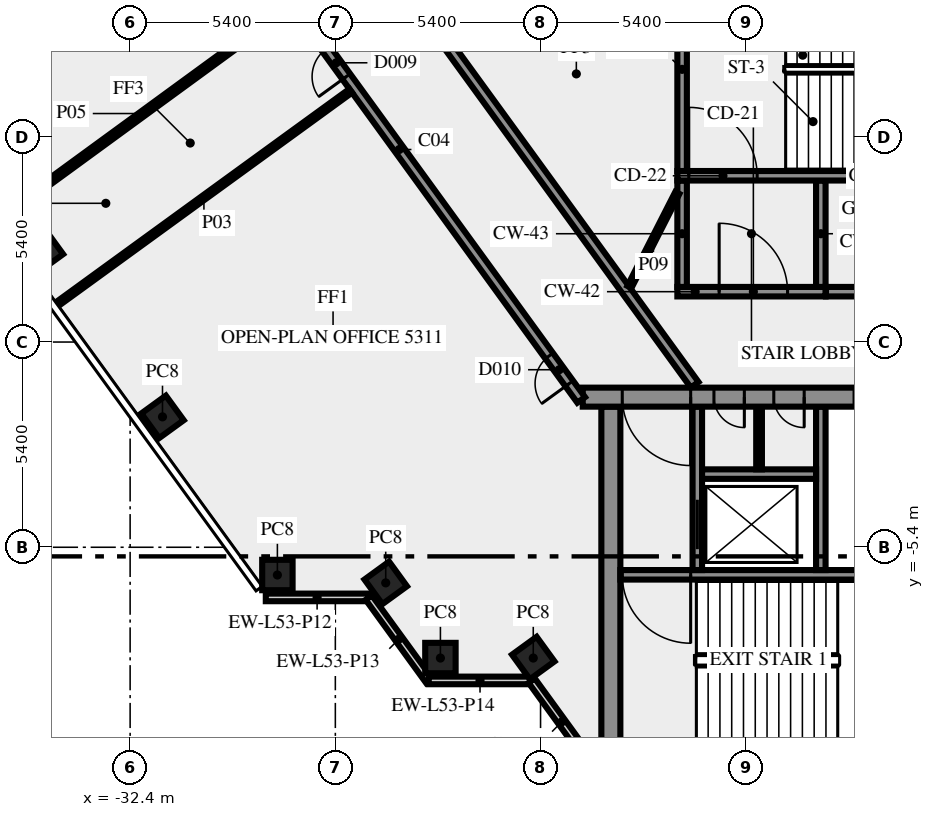
"""IFC4 building model, lengths in metres.
Left out: names, types, materials, properties, quantities, classifications, styles, units other than length and angle.
Written with IfcOpenShell. Run it as: python <this file> out.ifc"""

import sys

from ifc_helpers import new_model, si_unit, direction, frame, frame_2d, origin, origin_2d, place, context, subcontext, project, spatial, rectangle, extrude, element, fill, save


model = new_model("IFC4")
c1 = context("Model", 3, precision=1e-05, world=origin(), true_north=direction((0.0, 1.0)))
c2 = subcontext(c1, "Body", "Model", "MODEL_VIEW")
j1 = project(units=[si_unit("LENGTHUNIT", "METRE"), si_unit("PLANEANGLEUNIT", "RADIAN")], contexts=[c1])
p1 = place(None, origin())
s1 = spatial("IfcSite", under=j1, at=p1, CompositionType="ELEMENT")
p2 = place(p1, origin())
s2 = spatial("IfcBuilding", under=s1, at=p2, CompositionType="ELEMENT")
p3 = place(p2, frame((0.0, 0.0, 226.0)))
s3 = spatial("IfcBuildingStorey", under=s2, at=p3, CompositionType="ELEMENT", Elevation=226.0)
for number, where, z_axis, x_axis in (
    (1, (-34.722, 2.4, 0.0), (0.0, 0.0, 1.0), (0.588, -0.809, 0.0)),
    (2, (-31.548, -1.969, 0.0), (0.0, 0.0, 1.0), (0.588, -0.809, 0.0)),
    (3, (-28.525, -6.13, 0.0), (0.0, 0.0, 1.0), (1.0, 0.0, 0.0)),
    (4, (-25.674, -6.337, 0.0), (0.0, 0.0, 1.0), (0.588, -0.809, 0.0)),
    (5, (-24.235, -8.315, 0.0), (0.0, 0.0, 1.0), (1.0, 0.0, 0.0)),
    (6, (-21.792, -8.315, 0.0), (0.0, 0.0, 1.0), (0.588, -0.809, 0.0)),
):
    element("IfcColumn", number, at=place(p3, frame(where, z_axis=z_axis, x_axis=x_axis)), inside=s3, PredefinedType="COLUMN", context=c2, shape_type="SweptSolid", body=[
        extrude(rectangle(XDim=0.8, YDim=0.8, at=origin_2d()), origin(), (0.0, 0.0, 1.0), 3.65),
    ])
p4 = place(p3, frame((-28.83, -6.719, 0.0), z_axis=(0.0, 0.0, 1.0), x_axis=(1.0, 0.0, 0.0)))
e7 = element("IfcWall", 7, at=p4, inside=s3, PredefinedType="SOLIDWALL", context=c2, shape_type="SweptSolid", body=[
    extrude(rectangle(XDim=2.7, YDim=0.2, at=frame_2d((1.35, 0.0))), origin(), (0.0, 0.0, 1.0), 3.65),
])
p5 = place(p3, frame((-26.12, -6.724, 0.0), z_axis=(0.0, 0.0, 1.0), x_axis=(0.587720002413, -0.809064397168, 0.0)))
e8 = element("IfcWall", 8, at=p5, inside=s3, PredefinedType="SOLIDWALL", context=c2, shape_type="SweptSolid", body=[
    extrude(rectangle(XDim=2.7, YDim=0.2, at=frame_2d((1.35, 0.0))), origin(), (0.0, 0.0, 1.0), 3.65),
])
p6 = place(p3, frame((-24.543, -8.904, 0.0), z_axis=(0.0, 0.0, 1.0), x_axis=(1.0, 0.0, 0.0)))
e9 = element("IfcWall", 9, at=p6, inside=s3, PredefinedType="SOLIDWALL", context=c2, shape_type="SweptSolid", body=[
    extrude(rectangle(XDim=2.7, YDim=0.2, at=frame_2d((1.35, 0.0))), origin(), (0.0, 0.0, 1.0), 3.65),
])
p7 = place(p3, frame((-21.833, -8.909, 0.0), z_axis=(0.0, 0.0, 1.0), x_axis=(0.587766567315, -0.809030569476, 0.0)))
e10 = element("IfcWall", 10, at=p7, inside=s3, PredefinedType="SOLIDWALL", context=c2, shape_type="SweptSolid", body=[
    extrude(rectangle(XDim=2.688, YDim=0.2, at=frame_2d((1.344, 0.0))), origin(), (0.0, 0.0, 1.0), 3.65),
])
p8 = place(p3, frame((-19.75, -10.5, 0.0), z_axis=(0.0, 0.0, 1.0), x_axis=(0.0, 1.0, 0.0)))
e11 = element("IfcWall", 11, at=p8, inside=s3, PredefinedType="SHEAR", context=c2, shape_type="SweptSolid", body=[
    extrude(rectangle(XDim=8.8, YDim=0.5, at=frame_2d((4.4, 0.0))), origin(), (0.0, 0.0, 1.0), 3.65),
])
p9 = place(p3, frame((-11.45, -6.125, 0.0), z_axis=(0.0, 0.0, 1.0), x_axis=(-1.0, 0.0, 0.0)))
e12 = element("IfcWall", 12, at=p9, inside=s3, PredefinedType="SHEAR", context=c2, shape_type="SweptSolid", body=[
    extrude(rectangle(XDim=8.05, YDim=0.25, at=frame_2d((4.025, 0.0))), origin(), (0.0, 0.0, 1.0), 3.65),
])
p10 = place(p9, frame((6.2, 0.0, 0.0)))
e13 = element("IfcOpeningElement", 13, at=p10, cuts=e12, PredefinedType="OPENING", context=c2, shape_type="SweptSolid", body=[
    extrude(rectangle(XDim=1.8, YDim=2.1, at=frame_2d((0.9, 1.05))), frame((0.0, 0.135, 0.0), z_axis=(0.0, -1.0, 0.0), x_axis=(1.0, 0.0, 0.0)), (0.0, 0.0, 1.0), 0.27),
])
p11 = place(p3, frame((-17.475, -6.0, 0.0), z_axis=(0.0, 0.0, 1.0), x_axis=(0.0, 1.0, 0.0)))
e14 = element("IfcWall", 14, at=p11, inside=s3, PredefinedType="SHEAR", context=c2, shape_type="SweptSolid", body=[
    extrude(rectangle(XDim=4.3, YDim=0.25, at=frame_2d((2.15, 0.0))), origin(), (0.0, 0.0, 1.0), 3.65),
])
p12 = place(p11, frame((0.55, 0.0, 0.0)))
e15 = element("IfcOpeningElement", 15, at=p12, cuts=e14, PredefinedType="OPENING", context=c2, shape_type="SweptSolid", body=[
    extrude(rectangle(XDim=1.3, YDim=2.1, at=frame_2d((0.65, 1.05))), frame((0.0, 0.135, 0.0), z_axis=(0.0, -1.0, 0.0), x_axis=(1.0, 0.0, 0.0)), (0.0, 0.0, 1.0), 0.27),
])
p13 = place(p3, frame((-14.225, -6.0, 0.0), z_axis=(0.0, 0.0, 1.0), x_axis=(0.0, 1.0, 0.0)))
e16 = element("IfcWall", 16, at=p13, inside=s3, PredefinedType="SHEAR", context=c2, shape_type="SweptSolid", body=[
    extrude(rectangle(XDim=4.3, YDim=0.25, at=frame_2d((2.15, 0.0))), origin(), (0.0, 0.0, 1.0), 3.65),
])
p14 = place(p3, frame((-17.35, -3.475, 0.0), z_axis=(0.0, 0.0, 1.0), x_axis=(1.0, 0.0, 0.0)))
e17 = element("IfcWall", 17, at=p14, inside=s3, PredefinedType="SHEAR", context=c2, shape_type="SweptSolid", body=[
    extrude(rectangle(XDim=3.0, YDim=0.25, at=frame_2d((1.5, 0.0))), origin(), (0.0, 0.0, 1.0), 3.65),
])
p15 = place(p3, frame((-15.85, -3.35, 0.0), z_axis=(0.0, 0.0, 1.0), x_axis=(0.0, 1.0, 0.0)))
e18 = element("IfcWall", 18, at=p15, inside=s3, PredefinedType="PARTITIONING", context=c2, shape_type="SweptSolid", body=[
    extrude(rectangle(XDim=1.65, YDim=0.15, at=frame_2d((0.825, 0.0))), origin(), (0.0, 0.0, 1.0), 3.65),
])
p16 = place(p3, frame((20.49, -1.45, 0.0), z_axis=(0.0, 0.0, 1.0), x_axis=(-1.0, 0.0, 0.0)))
e19 = element("IfcWall", 19, at=p16, inside=s3, PredefinedType="SHEAR", context=c2, shape_type="SweptSolid", body=[
    extrude(rectangle(XDim=40.98, YDim=0.5, at=frame_2d((20.49, 0.0))), origin(), (0.0, 0.0, 1.0), 3.65),
])
p17 = place(p16, frame((38.14, 0.0, 0.0)))
e20 = element("IfcOpeningElement", 20, at=p17, cuts=e19, PredefinedType="OPENING", context=c2, shape_type="SweptSolid", body=[
    extrude(rectangle(XDim=1.8, YDim=2.1, at=frame_2d((0.9, 1.05))), frame((0.0, 0.26, 0.0), z_axis=(0.0, -1.0, 0.0), x_axis=(1.0, 0.0, 0.0)), (0.0, 0.0, 1.0), 0.52),
])
p18 = place(p16, frame((36.728, 0.0, 0.0)))
e21 = element("IfcOpeningElement", 21, at=p18, cuts=e19, PredefinedType="OPENING", context=c2, shape_type="SweptSolid", body=[
    extrude(rectangle(XDim=0.8, YDim=2.1, at=frame_2d((0.4, 1.05))), frame((0.0, 0.26, 0.0), z_axis=(0.0, -1.0, 0.0), x_axis=(1.0, 0.0, 0.0)), (0.0, 0.0, 1.0), 0.52),
])
p19 = place(p16, frame((35.153, 0.0, 0.0)))
e22 = element("IfcOpeningElement", 22, at=p19, cuts=e19, PredefinedType="OPENING", context=c2, shape_type="SweptSolid", body=[
    extrude(rectangle(XDim=0.8, YDim=2.1, at=frame_2d((0.4, 1.05))), frame((0.0, 0.26, 0.0), z_axis=(0.0, -1.0, 0.0), x_axis=(1.0, 0.0, 0.0)), (0.0, 0.0, 1.0), 0.52),
])
p20 = place(p16, frame((32.94, 0.0, 0.0)))
e23 = element("IfcOpeningElement", 23, at=p20, cuts=e19, PredefinedType="OPENING", context=c2, shape_type="SweptSolid", body=[
    extrude(rectangle(XDim=0.9, YDim=2.1, at=frame_2d((0.45, 1.05))), frame((0.0, 0.26, 0.0), z_axis=(0.0, -1.0, 0.0), x_axis=(1.0, 0.0, 0.0)), (0.0, 0.0, 1.0), 0.52),
])
p21 = place(p16, frame((30.202, 0.0, 0.0)))
e24 = element("IfcOpeningElement", 24, at=p21, cuts=e19, PredefinedType="OPENING", context=c2, shape_type="SweptSolid", body=[
    extrude(rectangle(XDim=0.9, YDim=2.1, at=frame_2d((0.45, 1.05))), frame((0.0, 0.26, 0.0), z_axis=(0.0, -1.0, 0.0), x_axis=(1.0, 0.0, 0.0)), (0.0, 0.0, 1.0), 0.52),
])
p22 = place(p16, frame((27.74, 0.0, 0.0)))
e25 = element("IfcOpeningElement", 25, at=p22, cuts=e19, PredefinedType="OPENING", context=c2, shape_type="SweptSolid", body=[
    extrude(rectangle(XDim=0.9, YDim=2.1, at=frame_2d((0.45, 1.05))), frame((0.0, 0.26, 0.0), z_axis=(0.0, -1.0, 0.0), x_axis=(1.0, 0.0, 0.0)), (0.0, 0.0, 1.0), 0.52),
])
p23 = place(p16, frame((25.377, 0.0, 0.0)))
e26 = element("IfcOpeningElement", 26, at=p23, cuts=e19, PredefinedType="OPENING", context=c2, shape_type="SweptSolid", body=[
    extrude(rectangle(XDim=0.9, YDim=2.1, at=frame_2d((0.45, 1.05))), frame((0.0, 0.26, 0.0), z_axis=(0.0, -1.0, 0.0), x_axis=(1.0, 0.0, 0.0)), (0.0, 0.0, 1.0), 0.52),
])
p24 = place(p16, frame((20.74, 0.0, 0.0)))
e27 = element("IfcOpeningElement", 27, at=p24, cuts=e19, PredefinedType="OPENING", context=c2, shape_type="SweptSolid", body=[
    extrude(rectangle(XDim=2.0, YDim=2.1, at=frame_2d((1.0, 1.05))), frame((0.0, 0.26, 0.0), z_axis=(0.0, -1.0, 0.0), x_axis=(1.0, 0.0, 0.0)), (0.0, 0.0, 1.0), 0.52),
])
p25 = place(p16, frame((7.14, 0.0, 0.0)))
e28 = element("IfcOpeningElement", 28, at=p25, cuts=e19, PredefinedType="OPENING", context=c2, shape_type="SweptSolid", body=[
    extrude(rectangle(XDim=0.9, YDim=2.1, at=frame_2d((0.45, 1.05))), frame((0.0, 0.26, 0.0), z_axis=(0.0, -1.0, 0.0), x_axis=(1.0, 0.0, 0.0)), (0.0, 0.0, 1.0), 0.52),
])
p26 = place(p16, frame((4.19, 0.0, 0.0)))
e29 = element("IfcOpeningElement", 29, at=p26, cuts=e19, PredefinedType="OPENING", context=c2, shape_type="SweptSolid", body=[
    extrude(rectangle(XDim=0.9, YDim=2.1, at=frame_2d((0.45, 1.05))), frame((0.0, 0.26, 0.0), z_axis=(0.0, -1.0, 0.0), x_axis=(1.0, 0.0, 0.0)), (0.0, 0.0, 1.0), 0.52),
])
p27 = place(p16, frame((1.04, 0.0, 0.0)))
e30 = element("IfcOpeningElement", 30, at=p27, cuts=e19, PredefinedType="OPENING", context=c2, shape_type="SweptSolid", body=[
    extrude(rectangle(XDim=1.8, YDim=2.1, at=frame_2d((0.9, 1.05))), frame((0.0, 0.26, 0.0), z_axis=(0.0, -1.0, 0.0), x_axis=(1.0, 0.0, 0.0)), (0.0, 0.0, 1.0), 0.52),
])
p28 = place(p3, frame((-18.0, 1.325, 0.0), z_axis=(0.0, 0.0, 1.0), x_axis=(1.0, 0.0, 0.0)))
e31 = element("IfcWall", 31, at=p28, inside=s3, PredefinedType="SHEAR", context=c2, shape_type="SweptSolid", body=[
    extrude(rectangle(XDim=3.9, YDim=0.25, at=frame_2d((1.95, 0.0))), origin(), (0.0, 0.0, 1.0), 3.65),
])
p29 = place(p28, frame((1.1, 0.0, 0.0)))
e32 = element("IfcOpeningElement", 32, at=p29, cuts=e31, PredefinedType="OPENING", context=c2, shape_type="SweptSolid", body=[
    extrude(rectangle(XDim=1.8, YDim=2.1, at=frame_2d((0.9, 1.05))), frame((0.0, 0.135, 0.0), z_axis=(0.0, -1.0, 0.0), x_axis=(1.0, 0.0, 0.0)), (0.0, 0.0, 1.0), 0.27),
])
for number, where, z_axis, x_axis in (
    (33, (-17.875, 1.45, 0.0), (0.0, 0.0, 1.0), (0.0, 1.0, 0.0)),
    (34, (-14.225, 1.45, 0.0), (0.0, 0.0, 1.0), (0.0, 1.0, 0.0)),
):
    element("IfcWall", number, at=place(p3, frame(where, z_axis=z_axis, x_axis=x_axis)), inside=s3, PredefinedType="SHEAR", context=c2, shape_type="SweptSolid", body=[
        extrude(rectangle(XDim=2.8, YDim=0.25, at=frame_2d((1.4, 0.0))), origin(), (0.0, 0.0, 1.0), 3.65),
    ])
p30 = place(p3, frame((-18.0, 4.375, 0.0), z_axis=(0.0, 0.0, 1.0), x_axis=(1.0, 0.0, 0.0)))
e35 = element("IfcWall", 35, at=p30, inside=s3, PredefinedType="SHEAR", context=c2, shape_type="SweptSolid", body=[
    extrude(rectangle(XDim=10.5, YDim=0.25, at=frame_2d((5.25, 0.0))), origin(), (0.0, 0.0, 1.0), 3.65),
])
p31 = place(p30, frame((0.3, 0.0, 0.0)))
e36 = element("IfcOpeningElement", 36, at=p31, cuts=e35, PredefinedType="OPENING", context=c2, shape_type="SweptSolid", body=[
    extrude(rectangle(XDim=1.8, YDim=2.1, at=frame_2d((0.9, 1.05))), frame((0.0, 0.135, 0.0), z_axis=(0.0, -1.0, 0.0), x_axis=(1.0, 0.0, 0.0)), (0.0, 0.0, 1.0), 0.27),
])
p32 = place(p3, frame((-17.875, 4.5, 0.0), z_axis=(0.0, 0.0, 1.0), x_axis=(0.0, 1.0, 0.0)))
e37 = element("IfcWall", 37, at=p32, inside=s3, PredefinedType="SHEAR", context=c2, shape_type="SweptSolid", body=[
    extrude(rectangle(XDim=5.35, YDim=0.25, at=frame_2d((2.675, 0.0))), origin(), (0.0, 0.0, 1.0), 3.65),
])
p33 = place(p3, frame((-20.531, -1.523, 0.0), z_axis=(0.0, 0.0, 1.0), x_axis=(-0.587784239999, 0.809017729849, 0.0)))
e38 = element("IfcWall", 38, at=p33, inside=s3, PredefinedType="SOLIDWALL", context=c2, shape_type="SweptSolid", body=[
    extrude(rectangle(XDim=23.271, YDim=0.25, at=frame_2d((11.635, 0.0))), origin(), (0.0, 0.0, 1.0), 3.65),
])
p34 = place(p33, frame((0.533, 0.0, 0.0)))
e39 = element("IfcOpeningElement", 39, at=p34, cuts=e38, PredefinedType="OPENING", context=c2, shape_type="SweptSolid", body=[
    extrude(rectangle(XDim=0.9, YDim=2.1, at=frame_2d((0.45, 1.05))), frame((0.0, 0.135, 0.0), z_axis=(0.0, -1.0, 0.0), x_axis=(1.0, 0.0, 0.0)), (0.0, 0.0, 1.0), 0.27),
])
p35 = place(p33, frame((17.106, 0.0, 0.0)))
e40 = element("IfcOpeningElement", 40, at=p35, cuts=e38, PredefinedType="OPENING", context=c2, shape_type="SweptSolid", body=[
    extrude(rectangle(XDim=1.8, YDim=2.1, at=frame_2d((0.9, 1.05))), frame((0.0, 0.135, 0.0), z_axis=(0.0, -1.0, 0.0), x_axis=(1.0, 0.0, 0.0)), (0.0, 0.0, 1.0), 0.27),
])
p36 = place(p33, frame((10.516, 0.0, 0.0)))
e41 = element("IfcOpeningElement", 41, at=p36, cuts=e38, PredefinedType="OPENING", context=c2, shape_type="SweptSolid", body=[
    extrude(rectangle(XDim=0.9, YDim=2.1, at=frame_2d((0.45, 1.05))), frame((0.0, 0.135, 0.0), z_axis=(0.0, -1.0, 0.0), x_axis=(1.0, 0.0, 0.0)), (0.0, 0.0, 1.0), 0.27),
])
p37 = place(p3, frame((-31.918, 18.658, 0.0), z_axis=(0.0, 0.0, 1.0), x_axis=(0.587788731405, -0.80901446664, 0.0)))
e42 = element("IfcWall", 42, at=p37, inside=s3, PredefinedType="SOLIDWALL", context=c2, shape_type="SweptSolid", body=[
    extrude(rectangle(XDim=24.453, YDim=0.25, at=frame_2d((12.227, 0.0))), origin(), (0.0, 0.0, 1.0), 3.65),
])
p38 = place(p37, frame((8.395, 0.0, 0.0)))
e43 = element("IfcOpeningElement", 43, at=p38, cuts=e42, PredefinedType="OPENING", context=c2, shape_type="SweptSolid", body=[
    extrude(rectangle(XDim=1.0, YDim=2.1, at=frame_2d((0.5, 1.05))), frame((0.0, 0.135, 0.0), z_axis=(0.0, -1.0, 0.0), x_axis=(1.0, 0.0, 0.0)), (0.0, 0.0, 1.0), 0.27),
])
p39 = place(p37, frame((10.095, 0.0, 0.0)))
e44 = element("IfcOpeningElement", 44, at=p39, cuts=e42, PredefinedType="OPENING", context=c2, shape_type="SweptSolid", body=[
    extrude(rectangle(XDim=0.9, YDim=2.1, at=frame_2d((0.45, 1.05))), frame((0.0, 0.135, 0.0), z_axis=(0.0, -1.0, 0.0), x_axis=(1.0, 0.0, 0.0)), (0.0, 0.0, 1.0), 0.27),
])
p40 = place(p3, frame((-14.09, 1.325, 0.0), z_axis=(0.0, 0.0, 1.0), x_axis=(1.0, 0.0, 0.0)))
e45 = element("IfcWall", 45, at=p40, inside=s3, PredefinedType="SOLIDWALL", context=c2, shape_type="SweptSolid", body=[
    extrude(rectangle(XDim=9.431, YDim=0.25, at=frame_2d((4.716, 0.0))), origin(), (0.0, 0.0, 1.0), 3.65),
])
p41 = place(p40, frame((3.765, 0.0, 0.0)))
e46 = element("IfcOpeningElement", 46, at=p41, cuts=e45, PredefinedType="OPENING", context=c2, shape_type="SweptSolid", body=[
    extrude(rectangle(XDim=1.8, YDim=2.1, at=frame_2d((0.9, 1.05))), frame((0.0, 0.135, 0.0), z_axis=(0.0, -1.0, 0.0), x_axis=(1.0, 0.0, 0.0)), (0.0, 0.0, 1.0), 0.27),
])
p42 = place(p3, frame((-26.595, 6.611, 0.0), z_axis=(0.0, 0.0, 1.0), x_axis=(-0.80900684162, -0.587799226107, 0.0)))
e47 = element("IfcWall", 47, at=p42, inside=s3, PredefinedType="PARTITIONING", context=c2, shape_type="SweptSolid", body=[
    extrude(rectangle(XDim=9.55, YDim=0.12, at=frame_2d((4.775, 0.0))), origin(), (0.0, 0.0, 1.0), 2.85),
])
p43 = place(p3, frame((-35.919, 3.197, 0.0), z_axis=(0.0, 0.0, 1.0), x_axis=(0.807645841498, 0.589667868135, 0.0)))
e48 = element("IfcWall", 48, at=p43, inside=s3, PredefinedType="PARTITIONING", context=c2, shape_type="SweptSolid", body=[
    extrude(rectangle(XDim=9.551, YDim=0.15, at=frame_2d((4.775, 0.0))), origin(), (0.0, 0.0, 1.0), 2.85),
])
p44 = place(p3, frame((-19.261, 1.45, 0.0), z_axis=(0.0, 0.0, 1.0), x_axis=(0.453950796792, 0.891026752736, 0.0)))
e49 = element("IfcWall", 49, at=p44, inside=s3, PredefinedType="PARTITIONING", context=c2, shape_type="SweptSolid", body=[
    extrude(rectangle(XDim=2.778, YDim=0.12, at=frame_2d((1.389, 0.0))), origin(), (0.0, 0.0, 1.0), 3.65),
])
p45 = place(p10, origin())
e50 = element("IfcDoor", 50, at=p45, inside=s3, OperationType="DOUBLE_DOOR_SINGLE_SWING", PredefinedType="DOOR", context=c2, shape_type="SweptSolid", body=[
    extrude(rectangle(XDim=1.8, YDim=2.1, at=frame_2d((0.9, 1.05))), frame((0.0, 0.025, 0.0), z_axis=(0.0, -1.0, 0.0), x_axis=(1.0, 0.0, 0.0)), (0.0, 0.0, 1.0), 0.05),
])
fill(e13, e50)
p46 = place(p12, origin())
e51 = element("IfcDoor", 51, at=p46, inside=s3, OperationType="DOUBLE_DOOR_SLIDING", PredefinedType="DOOR", context=c2, shape_type="SweptSolid", body=[
    extrude(rectangle(XDim=1.3, YDim=2.1, at=frame_2d((0.65, 1.05))), frame((0.0, 0.025, 0.0), z_axis=(0.0, -1.0, 0.0), x_axis=(1.0, 0.0, 0.0)), (0.0, 0.0, 1.0), 0.05),
])
fill(e15, e51)
p47 = place(p17, origin())
e52 = element("IfcDoor", 52, at=p47, inside=s3, OperationType="DOUBLE_DOOR_SINGLE_SWING", PredefinedType="DOOR", context=c2, shape_type="SweptSolid", body=[
    extrude(rectangle(XDim=1.8, YDim=2.1, at=frame_2d((0.9, 1.05))), frame((0.0, 0.025, 0.0), z_axis=(0.0, -1.0, 0.0), x_axis=(1.0, 0.0, 0.0)), (0.0, 0.0, 1.0), 0.05),
])
fill(e20, e52)
p48 = place(p18, origin())
e53 = element("IfcDoor", 53, at=p48, inside=s3, OperationType="SINGLE_SWING_RIGHT", PredefinedType="DOOR", context=c2, shape_type="SweptSolid", body=[
    extrude(rectangle(XDim=0.8, YDim=2.1, at=frame_2d((0.4, 1.05))), frame((0.0, 0.025, 0.0), z_axis=(0.0, -1.0, 0.0), x_axis=(1.0, 0.0, 0.0)), (0.0, 0.0, 1.0), 0.05),
])
fill(e21, e53)
p49 = place(p19, origin())
e54 = element("IfcDoor", 54, at=p49, inside=s3, OperationType="SINGLE_SWING_RIGHT", PredefinedType="DOOR", context=c2, shape_type="SweptSolid", body=[
    extrude(rectangle(XDim=0.8, YDim=2.1, at=frame_2d((0.4, 1.05))), frame((0.0, 0.025, 0.0), z_axis=(0.0, -1.0, 0.0), x_axis=(1.0, 0.0, 0.0)), (0.0, 0.0, 1.0), 0.05),
])
fill(e22, e54)
p50 = place(p29, origin())
e55 = element("IfcDoor", 55, at=p50, inside=s3, OperationType="DOUBLE_DOOR_SINGLE_SWING", PredefinedType="DOOR", context=c2, shape_type="SweptSolid", body=[
    extrude(rectangle(XDim=1.8, YDim=2.1, at=frame_2d((0.9, 1.05))), frame((0.0, 0.025, 0.0), z_axis=(0.0, -1.0, 0.0), x_axis=(1.0, 0.0, 0.0)), (0.0, 0.0, 1.0), 0.05),
])
fill(e32, e55)
p51 = place(p31, origin())
e56 = element("IfcDoor", 56, at=p51, inside=s3, OperationType="DOUBLE_DOOR_SINGLE_SWING", PredefinedType="DOOR", context=c2, shape_type="SweptSolid", body=[
    extrude(rectangle(XDim=1.8, YDim=2.1, at=frame_2d((0.9, 1.05))), frame((0.0, 0.025, 0.0), z_axis=(0.0, -1.0, 0.0), x_axis=(1.0, 0.0, 0.0)), (0.0, 0.0, 1.0), 0.05),
])
fill(e36, e56)
p52 = place(p34, origin())
e57 = element("IfcDoor", 57, at=p52, inside=s3, OperationType="SINGLE_SWING_LEFT", PredefinedType="DOOR", context=c2, shape_type="SweptSolid", body=[
    extrude(rectangle(XDim=0.9, YDim=2.1, at=frame_2d((0.45, 1.05))), frame((0.0, 0.025, 0.0), z_axis=(0.0, -1.0, 0.0), x_axis=(1.0, 0.0, 0.0)), (0.0, 0.0, 1.0), 0.05),
])
fill(e39, e57)
p53 = place(p36, origin())
e58 = element("IfcDoor", 58, at=p53, inside=s3, OperationType="SINGLE_SWING_LEFT", PredefinedType="DOOR", context=c2, shape_type="SweptSolid", body=[
    extrude(rectangle(XDim=0.9, YDim=2.1, at=frame_2d((0.45, 1.05))), frame((0.0, 0.025, 0.0), z_axis=(0.0, -1.0, 0.0), x_axis=(1.0, 0.0, 0.0)), (0.0, 0.0, 1.0), 0.05),
])
fill(e41, e58)
save(model, sys.argv[1])
